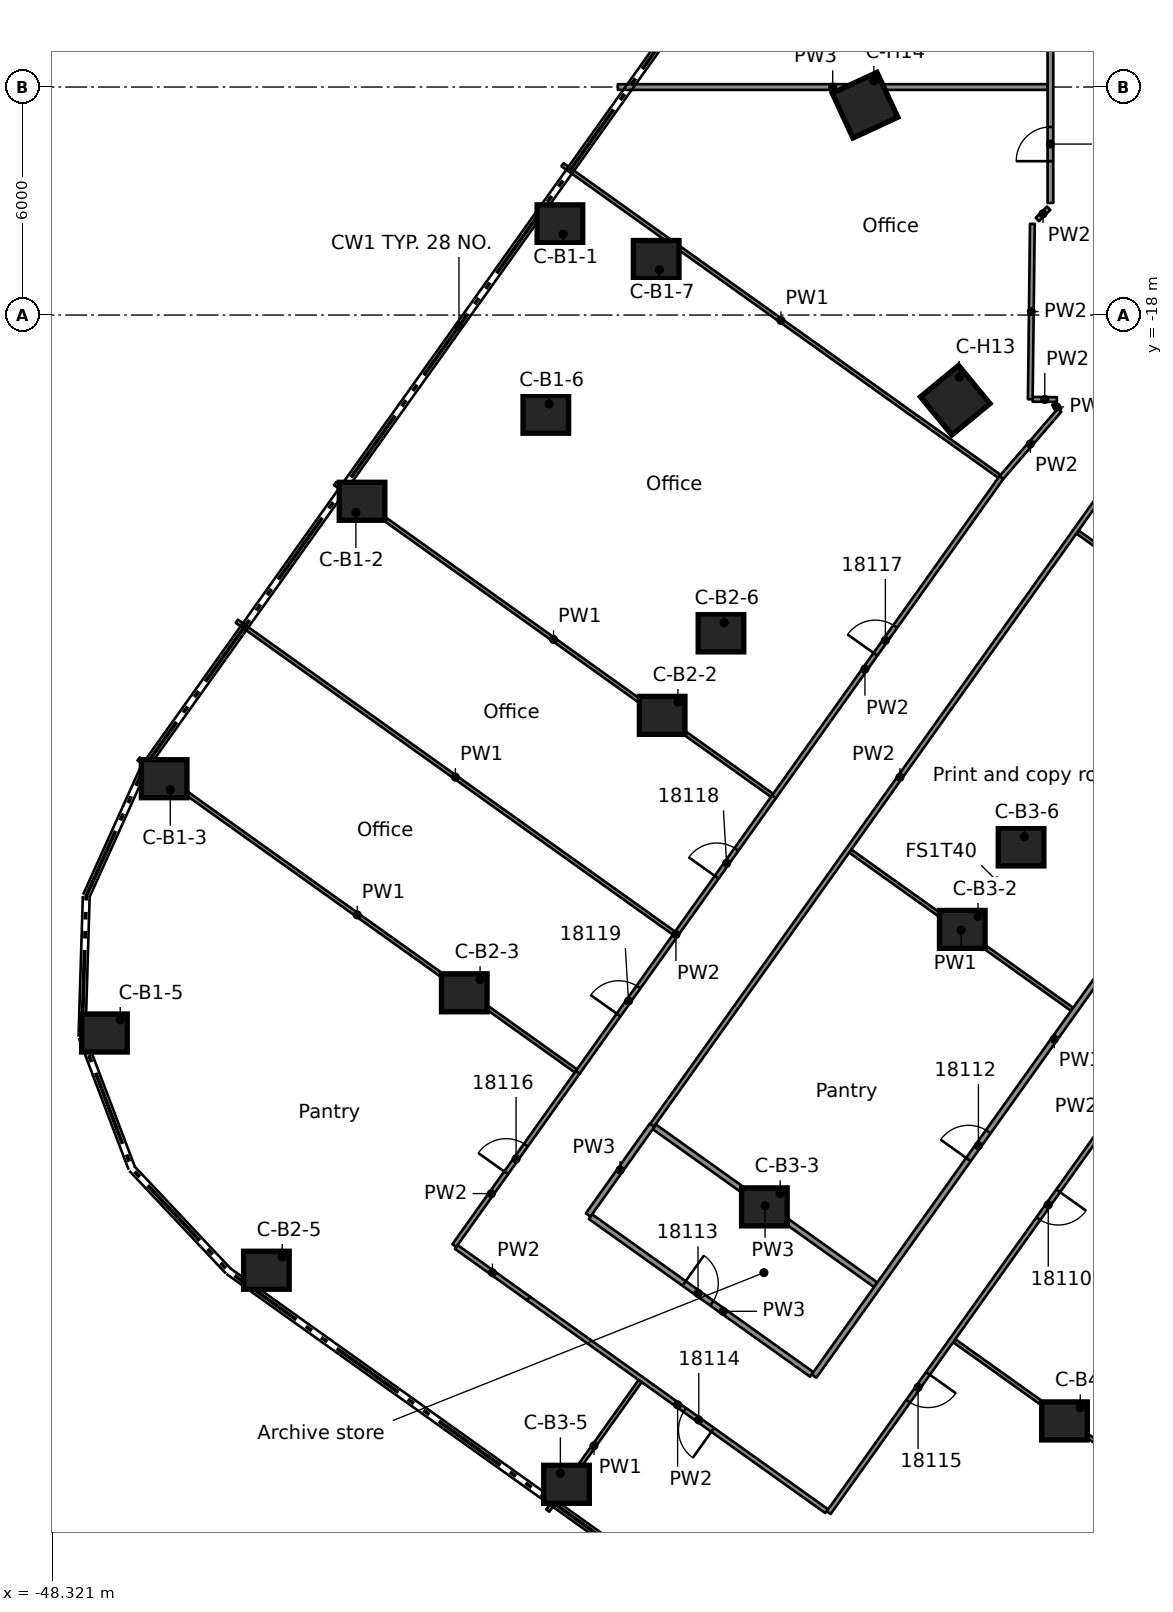
"""IFC4 building model, lengths in metres.
Left out: names, types, materials, properties, quantities, classifications, styles, units other than length and angle.
Written with IfcOpenShell. Run it as: python <this file> out.ifc"""

import sys

from ifc_helpers import new_model, si_unit, direction, frame, frame_2d, origin, origin_2d, place, context, subcontext, project, spatial, rectangle, extrude, element, fill, save


model = new_model("IFC4")
c1 = context("Model", 3, precision=1e-05, world=origin(), true_north=direction((0.0, 1.0)))
c2 = subcontext(c1, "Body", "Model", "MODEL_VIEW")
j1 = project(units=[si_unit("LENGTHUNIT", "METRE"), si_unit("PLANEANGLEUNIT", "RADIAN")], contexts=[c1])
p1 = place(None, origin())
s1 = spatial("IfcSite", under=j1, at=p1, CompositionType="ELEMENT")
p2 = place(p1, origin())
s2 = spatial("IfcBuilding", under=s1, at=p2, CompositionType="ELEMENT")
p3 = place(p2, frame((0.0, 0.0, 91.2)))
s3 = spatial("IfcBuildingStorey", under=s2, at=p3, CompositionType="ELEMENT", Elevation=91.2)
for number, where, z_axis, x_axis in (
    (1, (-34.957, -15.6, 0.0), (0.0, 0.0, 1.0), (1.0, 0.0, 0.0)),
    (2, (-40.164, -22.9, 0.0), (0.0, 0.0, 1.0), (1.0, 0.0, 0.0)),
    (3, (-45.371, -30.2, 0.0), (0.0, 0.0, 1.0), (1.0, 0.0, 0.0)),
    (4, (-46.942, -36.891, 0.0), (0.0, 0.0, 1.0), (1.0, 0.0, 0.0)),
    (5, (-35.328, -20.609, 0.0), (0.0, 0.0, 1.0), (1.0, 0.0, 0.0)),
    (6, (-32.424, -16.539, 0.0), (0.0, 0.0, 1.0), (1.0, 0.0, 0.0)),
    (7, (-32.267, -28.533, 0.0), (0.0, 0.0, 1.0), (1.0, 0.0, 0.0)),
    (8, (-37.474, -35.833, 0.0), (0.0, 0.0, 1.0), (1.0, 0.0, 0.0)),
    (9, (-42.681, -43.133, 0.0), (0.0, 0.0, 1.0), (1.0, 0.0, 0.0)),
    (10, (-30.719, -26.362, 0.0), (0.0, 0.0, 1.0), (1.0, 0.0, 0.0)),
    (11, (-24.37, -34.166, 0.0), (0.0, 0.0, 1.0), (1.0, 0.0, 0.0)),
    (12, (-29.577, -41.466, 0.0), (0.0, 0.0, 1.0), (1.0, 0.0, 0.0)),
    (13, (-34.784, -48.766, 0.0), (0.0, 0.0, 1.0), (1.0, 0.0, 0.0)),
    (14, (-22.822, -31.995, 0.0), (0.0, 0.0, 1.0), (1.0, 0.0, 0.0)),
    (15, (-21.68, -47.098, 0.0), (0.0, 0.0, 1.0), (1.0, 0.0, 0.0)),
):
    element("IfcColumn", number, at=place(p3, frame(where, z_axis=z_axis, x_axis=x_axis)), inside=s3, PredefinedType="COLUMN", context=c2, shape_type="SweptSolid", body=[
        extrude(rectangle(XDim=1.2, YDim=1.0, at=origin_2d()), origin(), (0.0, 0.0, 1.0), 3.5),
    ])
for number, where, z_axis, x_axis in (
    (16, (-24.555, -20.241, 0.0), (0.0, 0.0, 1.0), (-0.772, -0.636, 0.0)),
    (17, (-26.929, -12.478, 0.0), (0.0, 0.0, 1.0), (-0.907, -0.42, 0.0)),
):
    element("IfcColumn", number, at=place(p3, frame(where, z_axis=z_axis, x_axis=x_axis)), inside=s3, PredefinedType="COLUMN", context=c2, shape_type="SweptSolid", body=[
        extrude(rectangle(XDim=1.3, YDim=1.3, at=origin_2d()), origin(), (0.0, 0.0, 1.0), 3.5),
    ])
p4 = place(p3, frame((-21.955, -20.33, 0.0), z_axis=(0.0, 0.0, 1.0), x_axis=(0.635933908165, -0.771743522451, 0.0)))
e18 = element("IfcWall", 18, at=p4, inside=s3, PredefinedType="PARTITIONING", context=c2, shape_type="SweptSolid", body=[
    extrude(rectangle(XDim=0.227, YDim=0.125, at=frame_2d((0.113, 0.0))), origin(), (0.0, 0.0, 1.0), 3.08),
])
p5 = place(p3, frame((-37.685, -42.521, 0.0), z_axis=(0.0, 0.0, 1.0), x_axis=(0.81441767076, -0.580279120385, 0.0)))
e19 = element("IfcWall", 19, at=p5, inside=s3, PredefinedType="PARTITIONING", context=c2, shape_type="SweptSolid", body=[
    extrude(rectangle(XDim=2.337, YDim=0.125, at=frame_2d((1.168, 0.0))), origin(), (0.0, 0.0, 1.0), 3.08),
])
p6 = place(p3, frame((-27.938, -49.473, 0.0), z_axis=(0.0, 0.0, 1.0), x_axis=(-0.814120225936, 0.580696355871, 0.0)))
e20 = element("IfcWall", 20, at=p6, inside=s3, PredefinedType="PARTITIONING", context=c2, shape_type="SweptSolid", body=[
    extrude(rectangle(XDim=9.635, YDim=0.125, at=frame_2d((4.817, 0.0))), origin(), (0.0, 0.0, 1.0), 3.08),
])
p7 = place(p6, frame((3.684, 0.0, 0.0)))
e21 = element("IfcOpeningElement", 21, at=p7, cuts=e20, PredefinedType="OPENING", context=c2, shape_type="SweptSolid", body=[
    extrude(rectangle(XDim=0.9, YDim=2.1, at=frame_2d((0.45, 1.05))), frame((0.0, 0.073, 0.0), z_axis=(0.0, -1.0, 0.0), x_axis=(1.0, 0.0, 0.0)), (0.0, 0.0, 1.0), 0.145),
])
p8 = place(p3, frame((-34.153, -41.723, 0.0), z_axis=(0.0, 0.0, 1.0), x_axis=(0.814226878362, -0.580546803069, 0.0)))
e22 = element("IfcWall", 22, at=p8, inside=s3, PredefinedType="PARTITIONING", context=c2, shape_type="SweptSolid", body=[
    extrude(rectangle(XDim=7.15, YDim=0.15, at=frame_2d((3.575, 0.0))), origin(), (0.0, 0.0, 1.0), 3.08),
])
p9 = place(p8, frame((3.025, 0.0, 0.0)))
e23 = element("IfcOpeningElement", 23, at=p9, cuts=e22, PredefinedType="OPENING", context=c2, shape_type="SweptSolid", body=[
    extrude(rectangle(XDim=0.9, YDim=2.1, at=frame_2d((0.45, 1.05))), frame((0.0, 0.085, 0.0), z_axis=(0.0, -1.0, 0.0), x_axis=(1.0, 0.0, 0.0)), (0.0, 0.0, 1.0), 0.17),
])
p10 = place(p3, frame((-46.044, -29.68, 0.0), z_axis=(0.0, 0.0, 1.0), x_axis=(0.814139435618, -0.580669423486, 0.0)))
e24 = element("IfcWall", 24, at=p10, inside=s3, PredefinedType="PARTITIONING", context=c2, shape_type="SweptSolid", body=[
    extrude(rectangle(XDim=14.134, YDim=0.1, at=frame_2d((7.067, 0.0))), origin(), (0.0, 0.0, 1.0), 3.08),
])
p11 = place(p3, frame((-32.471, -39.361, 0.0), z_axis=(0.0, 0.0, 1.0), x_axis=(0.814159942616, -0.580640670156, 0.0)))
e25 = element("IfcWall", 25, at=p11, inside=s3, PredefinedType="PARTITIONING", context=c2, shape_type="SweptSolid", body=[
    extrude(rectangle(XDim=7.152, YDim=0.15, at=frame_2d((3.576, 0.0))), origin(), (0.0, 0.0, 1.0), 3.08),
])
p12 = place(p3, frame((-24.581, -44.988, 0.0), z_axis=(0.0, 0.0, 1.0), x_axis=(0.814126528241, -0.580687520112, 0.0)))
e26 = element("IfcWall", 26, at=p12, inside=s3, PredefinedType="PARTITIONING", context=c2, shape_type="SweptSolid", body=[
    extrude(rectangle(XDim=14.137, YDim=0.1, at=frame_2d((7.068, 0.0))), origin(), (0.0, 0.0, 1.0), 3.08),
])
p13 = place(p3, frame((-43.46, -26.057, 0.0), z_axis=(0.0, 0.0, 1.0), x_axis=(0.814102199131, -0.580721628124, 0.0)))
e27 = element("IfcWall", 27, at=p13, inside=s3, PredefinedType="PARTITIONING", context=c2, shape_type="SweptSolid", body=[
    extrude(rectangle(XDim=14.131, YDim=0.1, at=frame_2d((7.065, 0.0))), origin(), (0.0, 0.0, 1.0), 3.08),
])
p14 = place(p3, frame((-40.875, -22.433, 0.0), z_axis=(0.0, 0.0, 1.0), x_axis=(0.814073113892, -0.580762399987, 0.0)))
e28 = element("IfcWall", 28, at=p14, inside=s3, PredefinedType="PARTITIONING", context=c2, shape_type="SweptSolid", body=[
    extrude(rectangle(XDim=14.128, YDim=0.1, at=frame_2d((7.064, 0.0))), origin(), (0.0, 0.0, 1.0), 3.08),
])
p15 = place(p3, frame((-27.317, -32.104, 0.0), z_axis=(0.0, 0.0, 1.0), x_axis=(0.814119765042, -0.580697002031, 0.0)))
e29 = element("IfcWall", 29, at=p15, inside=s3, PredefinedType="PARTITIONING", context=c2, shape_type="SweptSolid", body=[
    extrude(rectangle(XDim=7.171, YDim=0.1, at=frame_2d((3.585, 0.0))), origin(), (0.0, 0.0, 1.0), 3.08),
])
p16 = place(p3, frame((-34.89, -14.043, 0.0), z_axis=(0.0, 0.0, 1.0), x_axis=(0.814114134431, -0.580704895898, 0.0)))
e30 = element("IfcWall", 30, at=p16, inside=s3, PredefinedType="PARTITIONING", context=c2, shape_type="SweptSolid", body=[
    extrude(rectangle(XDim=14.121, YDim=0.1, at=frame_2d((7.06, 0.0))), origin(), (0.0, 0.0, 1.0), 3.08),
])
p17 = place(p3, frame((-21.337, -23.709, 0.0), z_axis=(0.0, 0.0, 1.0), x_axis=(0.814073636445, -0.580761667507, 0.0)))
e31 = element("IfcWall", 31, at=p17, inside=s3, PredefinedType="PARTITIONING", context=c2, shape_type="SweptSolid", body=[
    extrude(rectangle(XDim=7.029, YDim=0.1, at=frame_2d((3.514, 0.0))), origin(), (0.0, 0.0, 1.0), 3.08),
])
p18 = place(p3, frame((-22.517, -20.217, 0.0), z_axis=(0.0, 0.0, 1.0), x_axis=(0.99993827732, -0.011110425304, 0.0)))
e32 = element("IfcWall", 32, at=p18, inside=s3, PredefinedType="PARTITIONING", context=c2, shape_type="SweptSolid", body=[
    extrude(rectangle(XDim=0.637, YDim=0.125, at=frame_2d((0.319, 0.0))), origin(), (0.0, 0.0, 1.0), 3.08),
])
p19 = place(p3, frame((-33.433, -12.0, 0.0), z_axis=(0.0, 0.0, 1.0), x_axis=(1.0, 0.0, 0.0)))
e33 = element("IfcWall", 33, at=p19, inside=s3, PredefinedType="PARTITIONING", context=c2, shape_type="SweptSolid", body=[
    extrude(rectangle(XDim=11.308, YDim=0.15, at=frame_2d((5.654, 0.0))), origin(), (0.0, 0.0, 1.0), 3.08),
])
p20 = place(p3, frame((-21.811, -20.505, 0.0), z_axis=(0.0, 0.0, 1.0), x_axis=(-0.65355749983, -0.756876868728, 0.0)))
e34 = element("IfcWall", 34, at=p20, inside=s3, PredefinedType="PARTITIONING", context=c2, shape_type="SweptSolid", body=[
    extrude(rectangle(XDim=2.344, YDim=0.125, at=frame_2d((1.172, 0.0))), origin(), (0.0, 0.0, 1.0), 3.08),
])
p21 = place(p3, frame((-22.395, -15.484, 0.0), z_axis=(0.0, 0.0, 1.0), x_axis=(0.712030137996, 0.702148903428, 0.0)))
e35 = element("IfcWall", 35, at=p21, inside=s3, PredefinedType="PARTITIONING", context=c2, shape_type="SweptSolid", body=[
    extrude(rectangle(XDim=0.42, YDim=0.125, at=frame_2d((0.21, 0.0))), origin(), (0.0, 0.0, 1.0), 3.08),
])
p22 = place(p3, frame((-13.48, -29.312, 0.0), z_axis=(0.0, 0.0, 1.0), x_axis=(-0.580603145907, -0.814186702767, 0.0)))
e36 = element("IfcWall", 36, at=p22, inside=s3, PredefinedType="PARTITIONING", context=c2, shape_type="SweptSolid", body=[
    extrude(rectangle(XDim=24.809, YDim=0.125, at=frame_2d((12.404, 0.0))), origin(), (0.0, 0.0, 1.0), 3.08),
])
p23 = place(p22, frame((4.601, 0.0, 0.0)))
e37 = element("IfcOpeningElement", 37, at=p23, cuts=e36, PredefinedType="OPENING", context=c2, shape_type="SweptSolid", body=[
    extrude(rectangle(XDim=0.9, YDim=2.1, at=frame_2d((0.45, 1.05))), frame((0.0, 0.073, 0.0), z_axis=(0.0, -1.0, 0.0), x_axis=(1.0, 0.0, 0.0)), (0.0, 0.0, 1.0), 0.145),
])
p24 = place(p22, frame((14.408, 0.0, 0.0)))
e38 = element("IfcOpeningElement", 38, at=p24, cuts=e36, PredefinedType="OPENING", context=c2, shape_type="SweptSolid", body=[
    extrude(rectangle(XDim=0.9, YDim=2.1, at=frame_2d((0.45, 1.05))), frame((0.0, 0.073, 0.0), z_axis=(0.0, -1.0, 0.0), x_axis=(1.0, 0.0, 0.0)), (0.0, 0.0, 1.0), 0.145),
])
p25 = place(p22, frame((20.309, 0.0, 0.0)))
e39 = element("IfcOpeningElement", 39, at=p25, cuts=e36, PredefinedType="OPENING", context=c2, shape_type="SweptSolid", body=[
    extrude(rectangle(XDim=0.9, YDim=2.1, at=frame_2d((0.45, 1.05))), frame((0.0, 0.073, 0.0), z_axis=(0.0, -1.0, 0.0), x_axis=(1.0, 0.0, 0.0)), (0.0, 0.0, 1.0), 0.145),
])
p26 = place(p3, frame((-28.27, -45.918, 0.0), z_axis=(0.0, 0.0, 1.0), x_axis=(0.580618548841, 0.81417571859, 0.0)))
e40 = element("IfcWall", 40, at=p26, inside=s3, PredefinedType="PARTITIONING", context=c2, shape_type="SweptSolid", body=[
    extrude(rectangle(XDim=21.772, YDim=0.15, at=frame_2d((10.886, 0.0))), origin(), (0.0, 0.0, 1.0), 3.08),
])
p27 = place(p26, frame((16.399, 0.0, 0.0)))
e41 = element("IfcOpeningElement", 41, at=p27, cuts=e40, PredefinedType="OPENING", context=c2, shape_type="SweptSolid", body=[
    extrude(rectangle(XDim=0.9, YDim=2.1, at=frame_2d((0.45, 1.05))), frame((0.0, 0.085, 0.0), z_axis=(0.0, -1.0, 0.0), x_axis=(1.0, 0.0, 0.0)), (0.0, 0.0, 1.0), 0.17),
])
p28 = place(p26, frame((6.999, 0.0, 0.0)))
e42 = element("IfcOpeningElement", 42, at=p28, cuts=e40, PredefinedType="OPENING", context=c2, shape_type="SweptSolid", body=[
    extrude(rectangle(XDim=0.9, YDim=2.1, at=frame_2d((0.45, 1.05))), frame((0.0, 0.085, 0.0), z_axis=(0.0, -1.0, 0.0), x_axis=(1.0, 0.0, 0.0)), (0.0, 0.0, 1.0), 0.17),
])
p29 = place(p3, frame((-35.277, -49.458, 0.0), z_axis=(0.0, 0.0, 1.0), x_axis=(0.580636826357, 0.814162683914, 0.0)))
e43 = element("IfcWall", 43, at=p29, inside=s3, PredefinedType="PARTITIONING", context=c2, shape_type="SweptSolid", body=[
    extrude(rectangle(XDim=4.187, YDim=0.1, at=frame_2d((2.094, 0.0))), origin(), (0.0, 0.0, 1.0), 3.08),
])
p30 = place(p3, frame((-32.532, -39.317, 0.0), z_axis=(0.0, 0.0, 1.0), x_axis=(0.58017556932, 0.814491441799, 0.0)))
e44 = element("IfcWall", 44, at=p30, inside=s3, PredefinedType="PARTITIONING", context=c2, shape_type="SweptSolid", body=[
    extrude(rectangle(XDim=22.483, YDim=0.125, at=frame_2d((11.241, 0.0))), origin(), (0.0, 0.0, 1.0), 3.08),
])
p31 = place(p3, frame((-34.214, -41.679, 0.0), z_axis=(0.0, 0.0, 1.0), x_axis=(0.580082812888, 0.814557505761, 0.0)))
e45 = element("IfcWall", 45, at=p31, inside=s3, PredefinedType="PARTITIONING", context=c2, shape_type="SweptSolid", body=[
    extrude(rectangle(XDim=2.9, YDim=0.15, at=frame_2d((1.45, 0.0))), origin(), (0.0, 0.0, 1.0), 3.08),
])
p32 = place(p3, frame((-37.736, -42.485, 0.0), z_axis=(0.0, 0.0, 1.0), x_axis=(0.580223472601, 0.814457317385, 0.0)))
e46 = element("IfcWall", 46, at=p32, inside=s3, PredefinedType="PARTITIONING", context=c2, shape_type="SweptSolid", body=[
    extrude(rectangle(XDim=5.601, YDim=0.125, at=frame_2d((2.801, 0.0))), origin(), (0.0, 0.0, 1.0), 3.08),
])
p33 = place(p32, frame((2.35, 0.0, 0.0)))
e47 = element("IfcOpeningElement", 47, at=p33, cuts=e46, PredefinedType="OPENING", context=c2, shape_type="SweptSolid", body=[
    extrude(rectangle(XDim=0.9, YDim=2.1, at=frame_2d((0.45, 1.05))), frame((0.0, 0.073, 0.0), z_axis=(0.0, -1.0, 0.0), x_axis=(1.0, 0.0, 0.0)), (0.0, 0.0, 1.0), 0.145),
])
p34 = place(p3, frame((-29.323, -30.674, 0.0), z_axis=(0.0, 0.0, 1.0), x_axis=(0.580180127153, 0.814488195161, 0.0)))
e48 = element("IfcWall", 48, at=p34, inside=s3, PredefinedType="PARTITIONING", context=c2, shape_type="SweptSolid", body=[
    extrude(rectangle(XDim=10.307, YDim=0.125, at=frame_2d((5.154, 0.0))), origin(), (0.0, 0.0, 1.0), 3.08),
])
p35 = place(p34, frame((4.6, 0.0, 0.0)))
e49 = element("IfcOpeningElement", 49, at=p35, cuts=e48, PredefinedType="OPENING", context=c2, shape_type="SweptSolid", body=[
    extrude(rectangle(XDim=0.9, YDim=2.1, at=frame_2d((0.45, 1.05))), frame((0.0, 0.073, 0.0), z_axis=(0.0, -1.0, 0.0), x_axis=(1.0, 0.0, 0.0)), (0.0, 0.0, 1.0), 0.145),
])
p36 = place(p3, frame((-34.486, -37.923, 0.0), z_axis=(0.0, 0.0, 1.0), x_axis=(0.580137406413, 0.814518624514, 0.0)))
e50 = element("IfcWall", 50, at=p36, inside=s3, PredefinedType="PARTITIONING", context=c2, shape_type="SweptSolid", body=[
    extrude(rectangle(XDim=8.9, YDim=0.125, at=frame_2d((4.45, 0.0))), origin(), (0.0, 0.0, 1.0), 3.08),
])
p37 = place(p36, frame((6.299, 0.0, 0.0)))
e51 = element("IfcOpeningElement", 51, at=p37, cuts=e50, PredefinedType="OPENING", context=c2, shape_type="SweptSolid", body=[
    extrude(rectangle(XDim=0.9, YDim=2.1, at=frame_2d((0.45, 1.05))), frame((0.0, 0.073, 0.0), z_axis=(0.0, -1.0, 0.0), x_axis=(1.0, 0.0, 0.0)), (0.0, 0.0, 1.0), 0.145),
])
p38 = place(p36, frame((1.85, 0.0, 0.0)))
e52 = element("IfcOpeningElement", 52, at=p38, cuts=e50, PredefinedType="OPENING", context=c2, shape_type="SweptSolid", body=[
    extrude(rectangle(XDim=0.9, YDim=2.1, at=frame_2d((0.45, 1.05))), frame((0.0, 0.073, 0.0), z_axis=(0.0, -1.0, 0.0), x_axis=(1.0, 0.0, 0.0)), (0.0, 0.0, 1.0), 0.145),
])
p39 = place(p3, frame((-22.58, -20.216, 0.0), z_axis=(0.0, 0.0, 1.0), x_axis=(0.011952390981, 0.999928567624, 0.0)))
e53 = element("IfcWall", 53, at=p39, inside=s3, PredefinedType="PARTITIONING", context=c2, shape_type="SweptSolid", body=[
    extrude(rectangle(XDim=4.616, YDim=0.125, at=frame_2d((2.308, 0.0))), origin(), (0.0, 0.0, 1.0), 3.08),
])
p40 = place(p3, frame((-22.05, -15.051, 0.0), z_axis=(0.0, 0.0, 1.0), x_axis=(0.0, 1.0, 0.0)))
e54 = element("IfcWall", 54, at=p40, inside=s3, PredefinedType="PARTITIONING", context=c2, shape_type="SweptSolid", body=[
    extrude(rectangle(XDim=30.102, YDim=0.15, at=frame_2d((15.051, 0.0))), origin(), (0.0, 0.0, 1.0), 3.08),
])
p41 = place(p40, frame((11.651, 0.0, 0.0)))
e55 = element("IfcOpeningElement", 55, at=p41, cuts=e54, PredefinedType="OPENING", context=c2, shape_type="SweptSolid", body=[
    extrude(rectangle(XDim=0.9, YDim=2.1, at=frame_2d((0.45, 1.05))), frame((0.0, 0.085, 0.0), z_axis=(0.0, -1.0, 0.0), x_axis=(1.0, 0.0, 0.0)), (0.0, 0.0, 1.0), 0.17),
])
p42 = place(p40, frame((1.1, 0.0, 0.0)))
e56 = element("IfcOpeningElement", 56, at=p42, cuts=e54, PredefinedType="OPENING", context=c2, shape_type="SweptSolid", body=[
    extrude(rectangle(XDim=0.9, YDim=2.1, at=frame_2d((0.45, 1.05))), frame((0.0, 0.085, 0.0), z_axis=(0.0, -1.0, 0.0), x_axis=(1.0, 0.0, 0.0)), (0.0, 0.0, 1.0), 0.17),
])
p43 = place(p40, frame((23.402, 0.0, 0.0)))
e57 = element("IfcOpeningElement", 57, at=p43, cuts=e54, PredefinedType="OPENING", context=c2, shape_type="SweptSolid", body=[
    extrude(rectangle(XDim=1.1, YDim=2.1, at=frame_2d((0.55, 1.05))), frame((0.0, 0.085, 0.0), z_axis=(0.0, -1.0, 0.0), x_axis=(1.0, 0.0, 0.0)), (0.0, 0.0, 1.0), 0.17),
])
p44 = place(p24, origin())
e58 = element("IfcDoor", 58, at=p44, inside=s3, OperationType="SINGLE_SWING_RIGHT", PredefinedType="DOOR", context=c2, shape_type="SweptSolid", body=[
    extrude(rectangle(XDim=0.9, YDim=2.1, at=frame_2d((0.45, 1.05))), frame((0.0, 0.025, 0.0), z_axis=(0.0, -1.0, 0.0), x_axis=(1.0, 0.0, 0.0)), (0.0, 0.0, 1.0), 0.05),
])
fill(e38, e58)
p45 = place(p28, origin())
e59 = element("IfcDoor", 59, at=p45, inside=s3, OperationType="SINGLE_SWING_LEFT", PredefinedType="DOOR", context=c2, shape_type="SweptSolid", body=[
    extrude(rectangle(XDim=0.9, YDim=2.1, at=frame_2d((0.45, 1.05))), frame((0.0, 0.025, 0.0), z_axis=(0.0, -1.0, 0.0), x_axis=(1.0, 0.0, 0.0)), (0.0, 0.0, 1.0), 0.05),
])
fill(e42, e59)
p46 = place(p9, origin())
e60 = element("IfcDoor", 60, at=p46, inside=s3, OperationType="SINGLE_SWING_LEFT", PredefinedType="DOOR", context=c2, shape_type="SweptSolid", body=[
    extrude(rectangle(XDim=0.9, YDim=2.1, at=frame_2d((0.45, 1.05))), frame((0.0, 0.025, 0.0), z_axis=(0.0, -1.0, 0.0), x_axis=(1.0, 0.0, 0.0)), (0.0, 0.0, 1.0), 0.05),
])
fill(e23, e60)
p47 = place(p7, origin())
e61 = element("IfcDoor", 61, at=p47, inside=s3, OperationType="SINGLE_SWING_LEFT", PredefinedType="DOOR", context=c2, shape_type="SweptSolid", body=[
    extrude(rectangle(XDim=0.9, YDim=2.1, at=frame_2d((0.45, 1.05))), frame((0.0, 0.025, 0.0), z_axis=(0.0, -1.0, 0.0), x_axis=(1.0, 0.0, 0.0)), (0.0, 0.0, 1.0), 0.05),
])
fill(e21, e61)
p48 = place(p25, origin())
e62 = element("IfcDoor", 62, at=p48, inside=s3, OperationType="SINGLE_SWING_RIGHT", PredefinedType="DOOR", context=c2, shape_type="SweptSolid", body=[
    extrude(rectangle(XDim=0.9, YDim=2.1, at=frame_2d((0.45, 1.05))), frame((0.0, 0.025, 0.0), z_axis=(0.0, -1.0, 0.0), x_axis=(1.0, 0.0, 0.0)), (0.0, 0.0, 1.0), 0.05),
])
fill(e39, e62)
p49 = place(p33, origin())
e63 = element("IfcDoor", 63, at=p49, inside=s3, OperationType="SINGLE_SWING_LEFT", PredefinedType="DOOR", context=c2, shape_type="SweptSolid", body=[
    extrude(rectangle(XDim=0.9, YDim=2.1, at=frame_2d((0.45, 1.05))), frame((0.0, 0.025, 0.0), z_axis=(0.0, -1.0, 0.0), x_axis=(1.0, 0.0, 0.0)), (0.0, 0.0, 1.0), 0.05),
])
fill(e47, e63)
p50 = place(p35, origin())
e64 = element("IfcDoor", 64, at=p50, inside=s3, OperationType="SINGLE_SWING_LEFT", PredefinedType="DOOR", context=c2, shape_type="SweptSolid", body=[
    extrude(rectangle(XDim=0.9, YDim=2.1, at=frame_2d((0.45, 1.05))), frame((0.0, 0.025, 0.0), z_axis=(0.0, -1.0, 0.0), x_axis=(1.0, 0.0, 0.0)), (0.0, 0.0, 1.0), 0.05),
])
fill(e49, e64)
p51 = place(p37, origin())
e65 = element("IfcDoor", 65, at=p51, inside=s3, OperationType="SINGLE_SWING_RIGHT", PredefinedType="DOOR", context=c2, shape_type="SweptSolid", body=[
    extrude(rectangle(XDim=0.9, YDim=2.1, at=frame_2d((0.45, 1.05))), frame((0.0, 0.025, 0.0), z_axis=(0.0, -1.0, 0.0), x_axis=(1.0, 0.0, 0.0)), (0.0, 0.0, 1.0), 0.05),
])
fill(e51, e65)
p52 = place(p38, origin())
e66 = element("IfcDoor", 66, at=p52, inside=s3, OperationType="SINGLE_SWING_LEFT", PredefinedType="DOOR", context=c2, shape_type="SweptSolid", body=[
    extrude(rectangle(XDim=0.9, YDim=2.1, at=frame_2d((0.45, 1.05))), frame((0.0, 0.025, 0.0), z_axis=(0.0, -1.0, 0.0), x_axis=(1.0, 0.0, 0.0)), (0.0, 0.0, 1.0), 0.05),
])
fill(e52, e66)
p53 = place(p42, origin())
e67 = element("IfcDoor", 67, at=p53, inside=s3, OperationType="SINGLE_SWING_LEFT", PredefinedType="DOOR", context=c2, shape_type="SweptSolid", body=[
    extrude(rectangle(XDim=0.9, YDim=2.1, at=frame_2d((0.45, 1.05))), frame((0.0, 0.025, 0.0), z_axis=(0.0, -1.0, 0.0), x_axis=(1.0, 0.0, 0.0)), (0.0, 0.0, 1.0), 0.05),
])
fill(e56, e67)
save(model, sys.argv[1])
